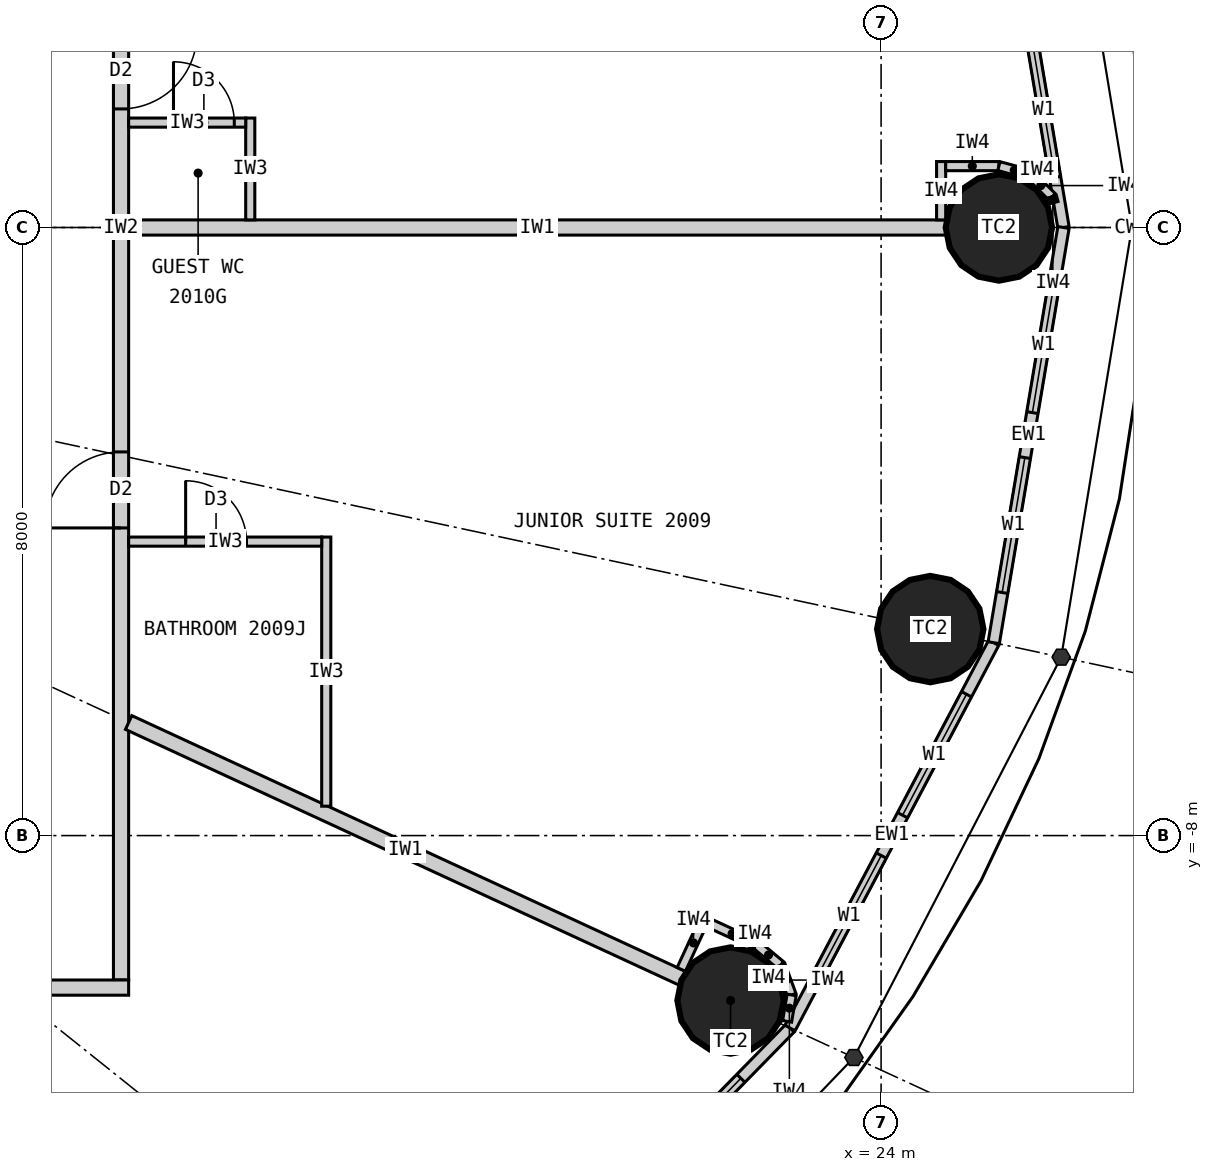
"""IFC4 building model, lengths in metres.
Left out: names, types, materials, properties, quantities, classifications, styles, units other than length and angle.
Written with IfcOpenShell. Run it as: python <this file> out.ifc"""

import sys

from ifc_helpers import new_model, si_unit, direction, frame, frame_2d, origin, origin_2d, place, context, subcontext, project, spatial, rectangle, circle, extrude, element, fill, save


model = new_model("IFC4")
c1 = context("Model", 3, precision=1e-05, world=origin(), true_north=direction((0.0, 1.0)))
c2 = subcontext(c1, "Body", "Model", "MODEL_VIEW")
j1 = project(units=[si_unit("LENGTHUNIT", "METRE"), si_unit("PLANEANGLEUNIT", "RADIAN")], contexts=[c1])
p1 = place(None, origin())
s1 = spatial("IfcSite", under=j1, at=p1, CompositionType="ELEMENT")
p2 = place(p1, origin())
s2 = spatial("IfcBuilding", under=s1, at=p2, CompositionType="ELEMENT")
p3 = place(p2, frame((0.0, 0.0, 80.4)))
s3 = spatial("IfcBuildingStorey", under=s2, at=p3, CompositionType="ELEMENT", Elevation=80.4)
for number, where, z_axis, x_axis in (
    (1, (25.55, 0.0, 0.0), (0.0, 0.0, 1.0), (1.0, 0.0, 0.0)),
    (2, (22.019, -10.17, 0.0), (0.0, 0.0, 1.0), (1.0, 0.0, 0.0)),
    (3, (24.647, -5.283, 0.0), (0.0, 0.0, 1.0), (1.0, 0.0, 0.0)),
):
    element("IfcColumn", number, at=place(p3, frame(where, z_axis=z_axis, x_axis=x_axis)), inside=s3, PredefinedType="COLUMN", context=c2, shape_type="SweptSolid", body=[
        extrude(circle(Radius=0.7, at=origin_2d()), origin(), (0.0, 0.0, 1.0), 3.3),
    ])
p4 = place(p3, frame((26.4, 0.0, 0.0), z_axis=(0.0, 0.0, 1.0), x_axis=(-0.165642551694, 0.986185857264, 0.0)))
e4 = element("IfcWall", 4, at=p4, inside=s3, PredefinedType="ELEMENTEDWALL", context=c2, shape_type="SweptSolid", body=[
    extrude(rectangle(XDim=5.539, YDim=0.15, at=frame_2d((2.77, 0.0))), origin(), (0.0, 0.0, 1.0), 3.12),
])
p5 = place(p4, frame((0.669, 0.0, 0.9)))
e5 = element("IfcOpeningElement", 5, at=p5, cuts=e4, PredefinedType="OPENING", context=c2, shape_type="SweptSolid", body=[
    extrude(rectangle(XDim=1.8, YDim=1.9, at=frame_2d((0.9, 0.95))), frame((0.0, 0.085, 0.0), z_axis=(0.0, -1.0, 0.0), x_axis=(1.0, 0.0, 0.0)), (0.0, 0.0, 1.0), 0.17),
])
p6 = place(p4, frame((3.07, 0.0, 0.9)))
e6 = element("IfcOpeningElement", 6, at=p6, cuts=e4, PredefinedType="OPENING", context=c2, shape_type="SweptSolid", body=[
    extrude(rectangle(XDim=1.8, YDim=1.9, at=frame_2d((0.9, 0.95))), frame((0.0, 0.085, 0.0), z_axis=(0.0, -1.0, 0.0), x_axis=(1.0, 0.0, 0.0)), (0.0, 0.0, 1.0), 0.17),
])
p7 = place(p3, frame((18.57, -14.856, 0.0), z_axis=(0.0, 0.0, 1.0), x_axis=(0.699602905915, 0.714531856557, 0.0)))
e7 = element("IfcWall", 7, at=p7, inside=s3, PredefinedType="ELEMENTEDWALL", context=c2, shape_type="SweptSolid", body=[
    extrude(rectangle(XDim=6.051, YDim=0.15, at=frame_2d((3.025, 0.0))), origin(), (0.0, 0.0, 1.0), 3.12),
])
p8 = place(p7, frame((0.926, 0.0, 0.9)))
e8 = element("IfcOpeningElement", 8, at=p8, cuts=e7, PredefinedType="OPENING", context=c2, shape_type="SweptSolid", body=[
    extrude(rectangle(XDim=1.8, YDim=1.9, at=frame_2d((0.9, 0.95))), frame((0.0, 0.085, 0.0), z_axis=(0.0, -1.0, 0.0), x_axis=(1.0, 0.0, 0.0)), (0.0, 0.0, 1.0), 0.17),
])
p9 = place(p7, frame((3.325, 0.0, 0.9)))
e9 = element("IfcOpeningElement", 9, at=p9, cuts=e7, PredefinedType="OPENING", context=c2, shape_type="SweptSolid", body=[
    extrude(rectangle(XDim=1.8, YDim=1.9, at=frame_2d((0.9, 0.95))), frame((0.0, 0.085, 0.0), z_axis=(0.0, -1.0, 0.0), x_axis=(1.0, 0.0, 0.0)), (0.0, 0.0, 1.0), 0.17),
])
p10 = place(p3, frame((22.803, -10.532, 0.0), z_axis=(0.0, 0.0, 1.0), x_axis=(0.467296867008, 0.884100468321, 0.0)))
e10 = element("IfcWall", 10, at=p10, inside=s3, PredefinedType="ELEMENTEDWALL", context=c2, shape_type="SweptSolid", body=[
    extrude(rectangle(XDim=5.734, YDim=0.15, at=frame_2d((2.867, 0.0))), origin(), (0.0, 0.0, 1.0), 3.12),
])
p11 = place(p10, frame((0.767, 0.0, 0.9)))
e11 = element("IfcOpeningElement", 11, at=p11, cuts=e10, PredefinedType="OPENING", context=c2, shape_type="SweptSolid", body=[
    extrude(rectangle(XDim=1.8, YDim=1.9, at=frame_2d((0.9, 0.95))), frame((0.0, 0.085, 0.0), z_axis=(0.0, -1.0, 0.0), x_axis=(1.0, 0.0, 0.0)), (0.0, 0.0, 1.0), 0.17),
])
p12 = place(p10, frame((3.167, 0.0, 0.9)))
e12 = element("IfcOpeningElement", 12, at=p12, cuts=e10, PredefinedType="OPENING", context=c2, shape_type="SweptSolid", body=[
    extrude(rectangle(XDim=1.8, YDim=1.9, at=frame_2d((0.9, 0.95))), frame((0.0, 0.085, 0.0), z_axis=(0.0, -1.0, 0.0), x_axis=(1.0, 0.0, 0.0)), (0.0, 0.0, 1.0), 0.17),
])
p13 = place(p3, frame((25.482, -5.462, 0.0), z_axis=(0.0, 0.0, 1.0), x_axis=(0.165642551694, 0.986185857264, 0.0)))
e13 = element("IfcWall", 13, at=p13, inside=s3, PredefinedType="ELEMENTEDWALL", context=c2, shape_type="SweptSolid", body=[
    extrude(rectangle(XDim=5.539, YDim=0.15, at=frame_2d((2.77, 0.0))), origin(), (0.0, 0.0, 1.0), 3.12),
])
p14 = place(p13, frame((0.669, 0.0, 0.9)))
e14 = element("IfcOpeningElement", 14, at=p14, cuts=e13, PredefinedType="OPENING", context=c2, shape_type="SweptSolid", body=[
    extrude(rectangle(XDim=1.8, YDim=1.9, at=frame_2d((0.9, 0.95))), frame((0.0, 0.085, 0.0), z_axis=(0.0, -1.0, 0.0), x_axis=(1.0, 0.0, 0.0)), (0.0, 0.0, 1.0), 0.17),
])
p15 = place(p13, frame((3.07, 0.0, 0.9)))
e15 = element("IfcOpeningElement", 15, at=p15, cuts=e13, PredefinedType="OPENING", context=c2, shape_type="SweptSolid", body=[
    extrude(rectangle(XDim=1.8, YDim=1.9, at=frame_2d((0.9, 0.95))), frame((0.0, 0.085, 0.0), z_axis=(0.0, -1.0, 0.0), x_axis=(1.0, 0.0, 0.0)), (0.0, 0.0, 1.0), 0.17),
])
p16 = place(p3, frame((14.0, -9.9, 0.0), z_axis=(0.0, 0.0, 1.0), x_axis=(0.0, 1.0, 0.0)))
e16 = element("IfcWall", 16, at=p16, inside=s3, PredefinedType="PARTITIONING", context=c2, shape_type="SweptSolid", body=[
    extrude(rectangle(XDim=19.8, YDim=0.2, at=frame_2d((9.9, 0.0))), origin(), (0.0, 0.0, 1.0), 3.12),
])
p17 = place(p16, frame((5.948, 0.0, 0.0)))
e17 = element("IfcOpeningElement", 17, at=p17, cuts=e16, PredefinedType="OPENING", context=c2, shape_type="SweptSolid", body=[
    extrude(rectangle(XDim=1.0, YDim=2.2, at=frame_2d((0.5, 1.1))), frame((0.0, 0.11, 0.0), z_axis=(0.0, -1.0, 0.0), x_axis=(1.0, 0.0, 0.0)), (0.0, 0.0, 1.0), 0.22),
])
p18 = place(p16, frame((11.46, 0.0, 0.0)))
e18 = element("IfcOpeningElement", 18, at=p18, cuts=e16, PredefinedType="OPENING", context=c2, shape_type="SweptSolid", body=[
    extrude(rectangle(XDim=1.0, YDim=2.2, at=frame_2d((0.5, 1.1))), frame((0.0, 0.11, 0.0), z_axis=(0.0, -1.0, 0.0), x_axis=(1.0, 0.0, 0.0)), (0.0, 0.0, 1.0), 0.22),
])
p19 = place(p3, frame((14.1, -10.0, 0.0), z_axis=(0.0, 0.0, 1.0), x_axis=(-1.0, 0.0, 0.0)))
e19 = element("IfcWall", 19, at=p19, inside=s3, PredefinedType="PARTITIONING", context=c2, shape_type="SweptSolid", body=[
    extrude(rectangle(XDim=28.2, YDim=0.2, at=frame_2d((14.1, 0.0))), origin(), (0.0, 0.0, 1.0), 3.12),
])
p20 = place(p19, frame((23.865, 0.0, 0.0)))
e20 = element("IfcOpeningElement", 20, at=p20, cuts=e19, PredefinedType="OPENING", context=c2, shape_type="SweptSolid", body=[
    extrude(rectangle(XDim=1.0, YDim=2.2, at=frame_2d((0.5, 1.1))), frame((0.0, 0.11, 0.0), z_axis=(0.0, -1.0, 0.0), x_axis=(1.0, 0.0, 0.0)), (0.0, 0.0, 1.0), 0.22),
])
p21 = place(p19, frame((18.529, 0.0, 0.0)))
e21 = element("IfcOpeningElement", 21, at=p21, cuts=e19, PredefinedType="OPENING", context=c2, shape_type="SweptSolid", body=[
    extrude(rectangle(XDim=1.0, YDim=2.2, at=frame_2d((0.5, 1.1))), frame((0.0, 0.11, 0.0), z_axis=(0.0, -1.0, 0.0), x_axis=(1.0, 0.0, 0.0)), (0.0, 0.0, 1.0), 0.22),
])
p22 = place(p19, frame((14.923, 0.0, 0.0)))
e22 = element("IfcOpeningElement", 22, at=p22, cuts=e19, PredefinedType="OPENING", context=c2, shape_type="SweptSolid", body=[
    extrude(rectangle(XDim=1.0, YDim=2.2, at=frame_2d((0.5, 1.1))), frame((0.0, 0.11, 0.0), z_axis=(0.0, -1.0, 0.0), x_axis=(1.0, 0.0, 0.0)), (0.0, 0.0, 1.0), 0.22),
])
p23 = place(p19, frame((2.801, 0.0, 0.0)))
e23 = element("IfcOpeningElement", 23, at=p23, cuts=e19, PredefinedType="OPENING", context=c2, shape_type="SweptSolid", body=[
    extrude(rectangle(XDim=1.0, YDim=2.2, at=frame_2d((0.5, 1.1))), frame((0.0, 0.11, 0.0), z_axis=(0.0, -1.0, 0.0), x_axis=(1.0, 0.0, 0.0)), (0.0, 0.0, 1.0), 0.22),
])
p24 = place(p3, frame((14.1, 0.0, 0.0), z_axis=(0.0, 0.0, 1.0), x_axis=(1.0, 0.0, 0.0)))
e24 = element("IfcWall", 24, at=p24, inside=s3, PredefinedType="PARTITIONING", context=c2, shape_type="SweptSolid", body=[
    extrude(rectangle(XDim=10.75, YDim=0.2, at=frame_2d((5.375, 0.0))), origin(), (0.0, 0.0, 1.0), 2.27),
])
p25 = place(p3, frame((14.1, -6.512, 0.0), z_axis=(0.0, 0.0, 1.0), x_axis=(0.907832871056, -0.419332181247, 0.0)))
e25 = element("IfcWall", 25, at=p25, inside=s3, PredefinedType="PARTITIONING", context=c2, shape_type="SweptSolid", body=[
    extrude(rectangle(XDim=8.023, YDim=0.2, at=frame_2d((4.011, 0.0))), origin(), (0.0, 0.0, 1.0), 2.32),
])
p26 = place(p3, frame((16.7, -7.613, 0.0), z_axis=(0.0, 0.0, 1.0), x_axis=(0.0, 1.0, 0.0)))
e26 = element("IfcWall", 26, at=p26, inside=s3, PredefinedType="PARTITIONING", context=c2, shape_type="SweptSolid", body=[
    extrude(rectangle(XDim=3.541, YDim=0.12, at=frame_2d((1.771, 0.0))), origin(), (0.0, 0.0, 1.0), 3.12),
])
p27 = place(p3, frame((14.1, -4.133, 0.0), z_axis=(0.0, 0.0, 1.0), x_axis=(1.0, 0.0, 0.0)))
e27 = element("IfcWall", 27, at=p27, inside=s3, PredefinedType="PARTITIONING", context=c2, shape_type="SweptSolid", body=[
    extrude(rectangle(XDim=2.54, YDim=0.12, at=frame_2d((1.27, 0.0))), origin(), (0.0, 0.0, 1.0), 2.32),
])
p28 = place(p27, frame((0.75, 0.0, 0.0)))
e28 = element("IfcOpeningElement", 28, at=p28, cuts=e27, PredefinedType="OPENING", context=c2, shape_type="SweptSolid", body=[
    extrude(rectangle(XDim=0.8, YDim=2.1, at=frame_2d((0.4, 1.05))), frame((0.0, 0.07, 0.0), z_axis=(0.0, -1.0, 0.0), x_axis=(1.0, 0.0, 0.0)), (0.0, 0.0, 1.0), 0.14),
])
p29 = place(p3, frame((15.7, 0.1, 0.0), z_axis=(0.0, 0.0, 1.0), x_axis=(0.0, 1.0, 0.0)))
e29 = element("IfcWall", 29, at=p29, inside=s3, PredefinedType="PARTITIONING", context=c2, shape_type="SweptSolid", body=[
    extrude(rectangle(XDim=1.34, YDim=0.12, at=frame_2d((0.67, 0.0))), origin(), (0.0, 0.0, 1.0), 3.12),
])
p30 = place(p3, frame((14.1, 1.38, 0.0), z_axis=(0.0, 0.0, 1.0), x_axis=(1.0, 0.0, 0.0)))
e30 = element("IfcWall", 30, at=p30, inside=s3, PredefinedType="PARTITIONING", context=c2, shape_type="SweptSolid", body=[
    extrude(rectangle(XDim=1.54, YDim=0.12, at=frame_2d((0.77, 0.0))), origin(), (0.0, 0.0, 1.0), 2.32),
])
p31 = place(p30, frame((0.59, 0.0, 0.0)))
e31 = element("IfcOpeningElement", 31, at=p31, cuts=e30, PredefinedType="OPENING", context=c2, shape_type="SweptSolid", body=[
    extrude(rectangle(XDim=0.8, YDim=2.1, at=frame_2d((0.4, 1.05))), frame((0.0, 0.07, 0.0), z_axis=(0.0, -1.0, 0.0), x_axis=(1.0, 0.0, 0.0)), (0.0, 0.0, 1.0), 0.14),
])
p32 = place(p3, frame((24.79, 0.1, 0.0), z_axis=(0.0, 0.0, 1.0), x_axis=(0.0, 1.0, 0.0)))
e32 = element("IfcWall", 32, at=p32, inside=s3, PredefinedType="PARTITIONING", context=c2, shape_type="SweptSolid", body=[
    extrude(rectangle(XDim=0.767, YDim=0.12, at=frame_2d((0.384, 0.0))), origin(), (0.0, 0.0, 1.0), 3.12),
])
p33 = place(p3, frame((24.85, 0.808, 0.0), z_axis=(0.0, 0.0, 1.0), x_axis=(1.0, 0.0, 0.0)))
e33 = element("IfcWall", 33, at=p33, inside=s3, PredefinedType="PARTITIONING", context=c2, shape_type="SweptSolid", body=[
    extrude(rectangle(XDim=0.7, YDim=0.12, at=frame_2d((0.35, 0.0))), origin(), (0.0, 0.0, 1.0), 3.12),
])
p34 = place(p3, frame((25.55, 0.808, 0.0), z_axis=(0.0, 0.0, 1.0), x_axis=(0.965807183573, -0.2592614205, 0.0)))
e34 = element("IfcWall", 34, at=p34, inside=s3, PredefinedType="PARTITIONING", context=c2, shape_type="SweptSolid", body=[
    extrude(rectangle(XDim=0.418, YDim=0.12, at=frame_2d((0.209, 0.0))), origin(), (0.0, 0.0, 1.0), 3.12),
])
p35 = place(p3, frame((25.954, 0.699, 0.0), z_axis=(0.0, 0.0, 1.0), x_axis=(0.707106781187, -0.707106781187, 0.0)))
e35 = element("IfcWall", 35, at=p35, inside=s3, PredefinedType="PARTITIONING", context=c2, shape_type="SweptSolid", body=[
    extrude(rectangle(XDim=0.418, YDim=0.12, at=frame_2d((0.209, 0.0))), origin(), (0.0, 0.0, 1.0), 3.12),
])
p36 = place(p3, frame((26.249, 0.404, 0.0), z_axis=(0.0, 0.0, 1.0), x_axis=(0.259754282609, -0.965674744759, 0.0)))
e36 = element("IfcWall", 36, at=p36, inside=s3, PredefinedType="PARTITIONING", context=c2, shape_type="SweptSolid", body=[
    extrude(rectangle(XDim=0.08, YDim=0.12, at=frame_2d((0.04, 0.0))), origin(), (0.0, 0.0, 1.0), 3.12),
])
p37 = place(p3, frame((21.371, -9.761, 0.0), z_axis=(0.0, 0.0, 1.0), x_axis=(0.419259891039, 0.907866258744, 0.0)))
e37 = element("IfcWall", 37, at=p37, inside=s3, PredefinedType="PARTITIONING", context=c2, shape_type="SweptSolid", body=[
    extrude(rectangle(XDim=0.768, YDim=0.12, at=frame_2d((0.384, 0.0))), origin(), (0.0, 0.0, 1.0), 3.12),
])
p38 = place(p3, frame((21.722, -9.144, 0.0), z_axis=(0.0, 0.0, 1.0), x_axis=(0.907877701396, -0.419235112208, 0.0)))
e38 = element("IfcWall", 38, at=p38, inside=s3, PredefinedType="PARTITIONING", context=c2, shape_type="SweptSolid", body=[
    extrude(rectangle(XDim=0.7, YDim=0.12, at=frame_2d((0.35, 0.0))), origin(), (0.0, 0.0, 1.0), 3.12),
])
p39 = place(p3, frame((22.358, -9.437, 0.0), z_axis=(0.0, 0.0, 1.0), x_axis=(0.768412687942, -0.639954639806, 0.0)))
e39 = element("IfcWall", 39, at=p39, inside=s3, PredefinedType="PARTITIONING", context=c2, shape_type="SweptSolid", body=[
    extrude(rectangle(XDim=0.418, YDim=0.12, at=frame_2d((0.209, 0.0))), origin(), (0.0, 0.0, 1.0), 3.12),
])
p40 = place(p3, frame((22.679, -9.705, 0.0), z_axis=(0.0, 0.0, 1.0), x_axis=(0.345164001646, -0.938542386879, 0.0)))
e40 = element("IfcWall", 40, at=p40, inside=s3, PredefinedType="PARTITIONING", context=c2, shape_type="SweptSolid", body=[
    extrude(rectangle(XDim=0.418, YDim=0.12, at=frame_2d((0.209, 0.0))), origin(), (0.0, 0.0, 1.0), 3.12),
])
p41 = place(p3, frame((22.823, -10.097, 0.0), z_axis=(0.0, 0.0, 1.0), x_axis=(-0.169674995186, -0.985500074079, 0.0)))
e41 = element("IfcWall", 41, at=p41, inside=s3, PredefinedType="PARTITIONING", context=c2, shape_type="SweptSolid", body=[
    extrude(rectangle(XDim=0.353, YDim=0.12, at=frame_2d((0.176, 0.0))), origin(), (0.0, 0.0, 1.0), 3.12),
])
p42 = place(p5, origin())
e42 = element("IfcWindow", 42, at=p42, inside=s3, PartitioningType="SINGLE_PANEL", PredefinedType="WINDOW", context=c2, shape_type="SweptSolid", body=[
    extrude(rectangle(XDim=1.8, YDim=1.9, at=frame_2d((0.9, 0.95))), frame((0.0, 0.03, 0.0), z_axis=(0.0, -1.0, 0.0), x_axis=(1.0, 0.0, 0.0)), (0.0, 0.0, 1.0), 0.06),
])
fill(e5, e42)
p43 = place(p9, origin())
e43 = element("IfcWindow", 43, at=p43, inside=s3, PartitioningType="SINGLE_PANEL", PredefinedType="WINDOW", context=c2, shape_type="SweptSolid", body=[
    extrude(rectangle(XDim=1.8, YDim=1.9, at=frame_2d((0.9, 0.95))), frame((0.0, 0.03, 0.0), z_axis=(0.0, -1.0, 0.0), x_axis=(1.0, 0.0, 0.0)), (0.0, 0.0, 1.0), 0.06),
])
fill(e9, e43)
p44 = place(p11, origin())
e44 = element("IfcWindow", 44, at=p44, inside=s3, PartitioningType="SINGLE_PANEL", PredefinedType="WINDOW", context=c2, shape_type="SweptSolid", body=[
    extrude(rectangle(XDim=1.8, YDim=1.9, at=frame_2d((0.9, 0.95))), frame((0.0, 0.03, 0.0), z_axis=(0.0, -1.0, 0.0), x_axis=(1.0, 0.0, 0.0)), (0.0, 0.0, 1.0), 0.06),
])
fill(e11, e44)
p45 = place(p12, origin())
e45 = element("IfcWindow", 45, at=p45, inside=s3, PartitioningType="SINGLE_PANEL", PredefinedType="WINDOW", context=c2, shape_type="SweptSolid", body=[
    extrude(rectangle(XDim=1.8, YDim=1.9, at=frame_2d((0.9, 0.95))), frame((0.0, 0.03, 0.0), z_axis=(0.0, -1.0, 0.0), x_axis=(1.0, 0.0, 0.0)), (0.0, 0.0, 1.0), 0.06),
])
fill(e12, e45)
p46 = place(p14, origin())
e46 = element("IfcWindow", 46, at=p46, inside=s3, PartitioningType="SINGLE_PANEL", PredefinedType="WINDOW", context=c2, shape_type="SweptSolid", body=[
    extrude(rectangle(XDim=1.8, YDim=1.9, at=frame_2d((0.9, 0.95))), frame((0.0, 0.03, 0.0), z_axis=(0.0, -1.0, 0.0), x_axis=(1.0, 0.0, 0.0)), (0.0, 0.0, 1.0), 0.06),
])
fill(e14, e46)
p47 = place(p15, origin())
e47 = element("IfcWindow", 47, at=p47, inside=s3, PartitioningType="SINGLE_PANEL", PredefinedType="WINDOW", context=c2, shape_type="SweptSolid", body=[
    extrude(rectangle(XDim=1.8, YDim=1.9, at=frame_2d((0.9, 0.95))), frame((0.0, 0.03, 0.0), z_axis=(0.0, -1.0, 0.0), x_axis=(1.0, 0.0, 0.0)), (0.0, 0.0, 1.0), 0.06),
])
fill(e15, e47)
p48 = place(p28, origin())
e48 = element("IfcDoor", 48, at=p48, inside=s3, OperationType="SINGLE_SWING_LEFT", PredefinedType="DOOR", context=c2, shape_type="SweptSolid", body=[
    extrude(rectangle(XDim=0.8, YDim=2.1, at=frame_2d((0.4, 1.05))), frame((0.0, 0.025, 0.0), z_axis=(0.0, -1.0, 0.0), x_axis=(1.0, 0.0, 0.0)), (0.0, 0.0, 1.0), 0.05),
])
fill(e28, e48)
p49 = place(p17, origin())
e49 = element("IfcDoor", 49, at=p49, inside=s3, OperationType="SINGLE_SWING_LEFT", PredefinedType="DOOR", context=c2, shape_type="SweptSolid", body=[
    extrude(rectangle(XDim=1.0, YDim=2.2, at=frame_2d((0.5, 1.1))), frame((0.0, 0.025, 0.0), z_axis=(0.0, -1.0, 0.0), x_axis=(1.0, 0.0, 0.0)), (0.0, 0.0, 1.0), 0.05),
])
fill(e17, e49)
p50 = place(p31, origin())
e50 = element("IfcDoor", 50, at=p50, inside=s3, OperationType="SINGLE_SWING_LEFT", PredefinedType="DOOR", context=c2, shape_type="SweptSolid", body=[
    extrude(rectangle(XDim=0.8, YDim=2.1, at=frame_2d((0.4, 1.05))), frame((0.0, 0.025, 0.0), z_axis=(0.0, -1.0, 0.0), x_axis=(1.0, 0.0, 0.0)), (0.0, 0.0, 1.0), 0.05),
])
fill(e31, e50)
p51 = place(p18, origin())
e51 = element("IfcDoor", 51, at=p51, inside=s3, OperationType="SINGLE_SWING_RIGHT", PredefinedType="DOOR", context=c2, shape_type="SweptSolid", body=[
    extrude(rectangle(XDim=1.0, YDim=2.2, at=frame_2d((0.5, 1.1))), frame((0.0, 0.025, 0.0), z_axis=(0.0, -1.0, 0.0), x_axis=(1.0, 0.0, 0.0)), (0.0, 0.0, 1.0), 0.05),
])
fill(e18, e51)
save(model, sys.argv[1])
